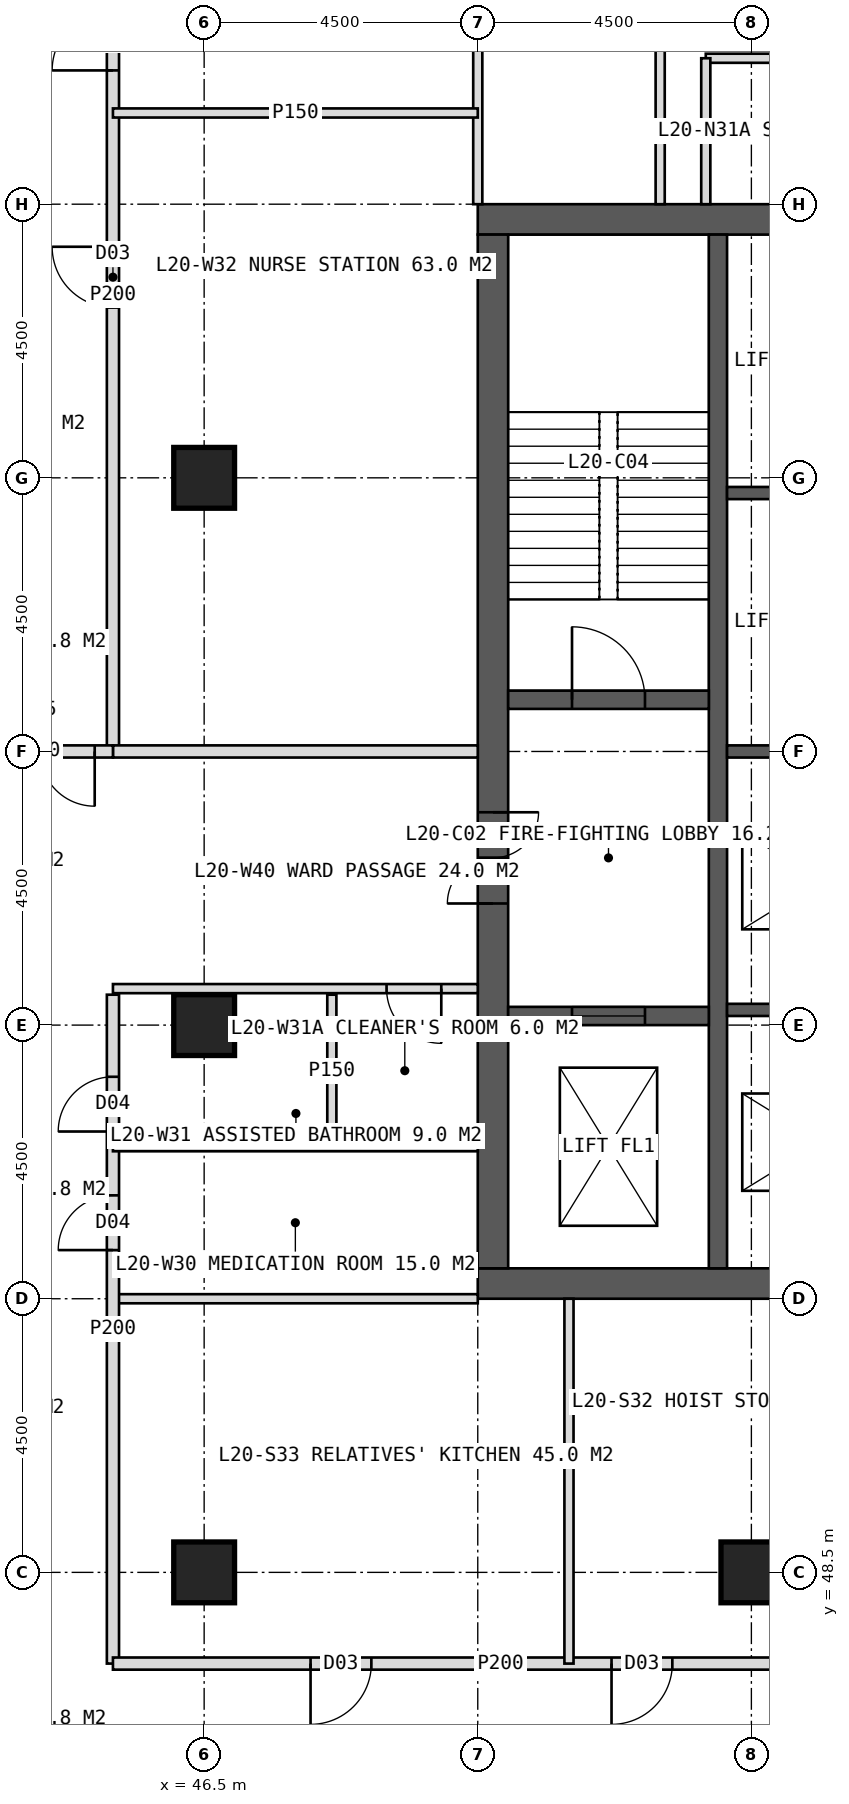
"""IFC4 building model, lengths in metres.
Left out: names, types, materials, properties, quantities, classifications, styles, units other than length and angle.
Written with IfcOpenShell. Run it as: python <this file> out.ifc"""

import sys

from ifc_helpers import new_model, si_unit, direction, frame, frame_2d, origin, origin_2d, place, context, subcontext, project, spatial, rectangle, hollow_rectangle, extrude, element, fill, save


model = new_model("IFC4")
c1 = context("Model", 3, precision=1e-05, world=origin(), true_north=direction((0.0, 1.0)))
c2 = subcontext(c1, "Body", "Model", "MODEL_VIEW")
j1 = project(units=[si_unit("LENGTHUNIT", "METRE"), si_unit("PLANEANGLEUNIT", "RADIAN")], contexts=[c1])
p1 = place(None, origin())
s1 = spatial("IfcSite", under=j1, at=p1, CompositionType="ELEMENT")
p2 = place(p1, origin())
s2 = spatial("IfcBuilding", under=s1, at=p2, CompositionType="ELEMENT")
p3 = place(p2, frame((0.0, 0.0, 87.0)))
s3 = spatial("IfcBuildingStorey", under=s2, at=p3, CompositionType="ELEMENT", Elevation=87.0)
p4 = place(p3, frame((51.0, 70.75, 0.0), z_axis=(0.0, 0.0, 1.0), x_axis=(1.0, 0.0, 0.0)))
e1 = element("IfcWall", 1, at=p4, inside=s3, PredefinedType="SHEAR", context=c2, shape_type="SweptSolid", body=[
    extrude(rectangle(XDim=18.0, YDim=0.5, at=frame_2d((9.0, 0.0))), origin(), (0.0, 0.0, 1.0), 4.0),
])
p5 = place(p4, frame((8.1, 0.0, 0.0)))
e2 = element("IfcOpeningElement", 2, at=p5, cuts=e1, PredefinedType="OPENING", context=c2, shape_type="SweptSolid", body=[
    extrude(rectangle(XDim=1.8, YDim=2.2, at=frame_2d((0.9, 1.1))), frame((0.0, 0.26, 0.0), z_axis=(0.0, -1.0, 0.0), x_axis=(1.0, 0.0, 0.0)), (0.0, 0.0, 1.0), 0.52),
])
p6 = place(p3, frame((51.0, 53.25, 0.0), z_axis=(0.0, 0.0, 1.0), x_axis=(1.0, 0.0, 0.0)))
e3 = element("IfcWall", 3, at=p6, inside=s3, PredefinedType="SHEAR", context=c2, shape_type="SweptSolid", body=[
    extrude(rectangle(XDim=18.0, YDim=0.5, at=frame_2d((9.0, 0.0))), origin(), (0.0, 0.0, 1.0), 4.0),
])
p7 = place(p6, frame((8.1, 0.0, 0.0)))
e4 = element("IfcOpeningElement", 4, at=p7, cuts=e3, PredefinedType="OPENING", context=c2, shape_type="SweptSolid", body=[
    extrude(rectangle(XDim=1.8, YDim=2.2, at=frame_2d((0.9, 1.1))), frame((0.0, 0.26, 0.0), z_axis=(0.0, -1.0, 0.0), x_axis=(1.0, 0.0, 0.0)), (0.0, 0.0, 1.0), 0.52),
])
p8 = place(p3, frame((51.25, 53.5, 0.0), z_axis=(0.0, 0.0, 1.0), x_axis=(0.0, 1.0, 0.0)))
e5 = element("IfcWall", 5, at=p8, inside=s3, PredefinedType="SHEAR", context=c2, shape_type="SweptSolid", body=[
    extrude(rectangle(XDim=17.0, YDim=0.5, at=frame_2d((8.5, 0.0))), origin(), (0.0, 0.0, 1.0), 4.0),
])
p9 = place(p8, frame((6.0, 0.0, 0.0)))
e6 = element("IfcOpeningElement", 6, at=p9, cuts=e5, PredefinedType="OPENING", context=c2, shape_type="SweptSolid", body=[
    extrude(rectangle(XDim=1.5, YDim=2.2, at=frame_2d((0.75, 1.1))), frame((0.0, 0.26, 0.0), z_axis=(0.0, -1.0, 0.0), x_axis=(1.0, 0.0, 0.0)), (0.0, 0.0, 1.0), 0.52),
])
p10 = place(p3, frame((54.95, 53.5, 0.0), z_axis=(0.0, 0.0, 1.0), x_axis=(0.0, 1.0, 0.0)))
e7 = element("IfcWall", 7, at=p10, inside=s3, PredefinedType="SHEAR", context=c2, shape_type="SweptSolid", body=[
    extrude(rectangle(XDim=17.0, YDim=0.3, at=frame_2d((8.5, 0.0))), origin(), (0.0, 0.0, 1.0), 4.0),
])
for number, where, z_axis, x_axis in (
    (8, (55.1, 57.75, 0.0), (0.0, 0.0, 1.0), (1.0, 0.0, 0.0)),
    (9, (55.1, 62.0, 0.0), (0.0, 0.0, 1.0), (1.0, 0.0, 0.0)),
    (10, (55.1, 66.25, 0.0), (0.0, 0.0, 1.0), (1.0, 0.0, 0.0)),
):
    element("IfcWall", number, at=place(p3, frame(where, z_axis=z_axis, x_axis=x_axis)), inside=s3, PredefinedType="SHEAR", context=c2, shape_type="SweptSolid", body=[
        extrude(rectangle(XDim=3.05, YDim=0.2, at=frame_2d((1.525, 0.0))), origin(), (0.0, 0.0, 1.0), 4.0),
    ])
p11 = place(p3, frame((51.5, 62.85, 0.0), z_axis=(0.0, 0.0, 1.0), x_axis=(1.0, 0.0, 0.0)))
e11 = element("IfcWall", 11, at=p11, inside=s3, PredefinedType="SHEAR", context=c2, shape_type="SweptSolid", body=[
    extrude(rectangle(XDim=3.3, YDim=0.3, at=frame_2d((1.65, 0.0))), origin(), (0.0, 0.0, 1.0), 4.0),
])
p12 = place(p11, frame((1.05, 0.0, 0.0)))
e12 = element("IfcOpeningElement", 12, at=p12, cuts=e11, PredefinedType="OPENING", context=c2, shape_type="SweptSolid", body=[
    extrude(rectangle(XDim=1.2, YDim=2.1, at=frame_2d((0.6, 1.05))), frame((0.0, 0.16, 0.0), z_axis=(0.0, -1.0, 0.0), x_axis=(1.0, 0.0, 0.0)), (0.0, 0.0, 1.0), 0.32),
])
p13 = place(p3, frame((51.5, 57.65, 0.0), z_axis=(0.0, 0.0, 1.0), x_axis=(1.0, 0.0, 0.0)))
e13 = element("IfcWall", 13, at=p13, inside=s3, PredefinedType="SHEAR", context=c2, shape_type="SweptSolid", body=[
    extrude(rectangle(XDim=3.3, YDim=0.3, at=frame_2d((1.65, 0.0))), origin(), (0.0, 0.0, 1.0), 4.0),
])
p14 = place(p13, frame((1.05, 0.0, 0.0)))
e14 = element("IfcOpeningElement", 14, at=p14, cuts=e13, PredefinedType="OPENING", context=c2, shape_type="SweptSolid", body=[
    extrude(rectangle(XDim=1.2, YDim=2.2, at=frame_2d((0.6, 1.1))), frame((0.0, 0.16, 0.0), z_axis=(0.0, -1.0, 0.0), x_axis=(1.0, 0.0, 0.0)), (0.0, 0.0, 1.0), 0.32),
])
for number, where, z_axis, x_axis in (
    (15, (46.5, 48.5, 0.0), (0.0, 0.0, 1.0), (1.0, 0.0, 0.0)),
    (16, (55.5, 48.5, 0.0), (0.0, 0.0, 1.0), (1.0, 0.0, 0.0)),
    (17, (46.5, 57.5, 0.0), (0.0, 0.0, 1.0), (1.0, 0.0, 0.0)),
    (18, (46.5, 66.5, 0.0), (0.0, 0.0, 1.0), (1.0, 0.0, 0.0)),
):
    element("IfcColumn", number, at=place(p3, frame(where, z_axis=z_axis, x_axis=x_axis)), inside=s3, PredefinedType="COLUMN", context=c2, shape_type="SweptSolid", body=[
        extrude(hollow_rectangle(XDim=1.0, YDim=1.0, WallThickness=0.1, at=origin_2d()), origin(), (0.0, 0.0, 1.0), 4.0),
    ])
for number, where, z_axis, x_axis in (
    (19, (51.0, 71.0, 0.0), (0.0, 0.0, 1.0), (0.0, 1.0, 0.0)),
    (20, (54.0, 71.0, 0.0), (0.0, 0.0, 1.0), (0.0, 1.0, 0.0)),
):
    element("IfcWall", number, at=place(p3, frame(where, z_axis=z_axis, x_axis=x_axis)), inside=s3, PredefinedType="PARTITIONING", context=c2, shape_type="SweptSolid", body=[
        extrude(rectangle(XDim=6.0, YDim=0.15, at=frame_2d((3.0, 0.0))), origin(), (0.0, 0.0, 1.0), 3.75),
    ])
p15 = place(p3, frame((54.75, 73.4, 0.0), z_axis=(0.0, 0.0, 1.0), x_axis=(1.0, 0.0, 0.0)))
e21 = element("IfcWall", 21, at=p15, inside=s3, PredefinedType="PARTITIONING", context=c2, shape_type="SweptSolid", body=[
    extrude(rectangle(XDim=3.0, YDim=0.15, at=frame_2d((1.5, 0.0))), origin(), (0.0, 0.0, 1.0), 3.75),
])
p16 = place(p3, frame((54.75, 71.0, 0.0), z_axis=(0.0, 0.0, 1.0), x_axis=(0.0, 1.0, 0.0)))
e22 = element("IfcWall", 22, at=p16, inside=s3, PredefinedType="PARTITIONING", context=c2, shape_type="SweptSolid", body=[
    extrude(rectangle(XDim=2.4, YDim=0.15, at=frame_2d((1.2, 0.0))), origin(), (0.0, 0.0, 1.0), 3.75),
])
p17 = place(p3, frame((51.0, 53.0, 0.0), z_axis=(0.0, 0.0, 1.0), x_axis=(-1.0, 0.0, 0.0)))
e23 = element("IfcWall", 23, at=p17, inside=s3, PredefinedType="PARTITIONING", context=c2, shape_type="SweptSolid", body=[
    extrude(rectangle(XDim=6.0, YDim=0.15, at=frame_2d((3.0, 0.0))), origin(), (0.0, 0.0, 1.0), 3.75),
])
p18 = place(p3, frame((45.0, 47.0, 0.0), z_axis=(0.0, 0.0, 1.0), x_axis=(0.0, 1.0, 0.0)))
e24 = element("IfcWall", 24, at=p18, inside=s3, PredefinedType="PARTITIONING", context=c2, shape_type="SweptSolid", body=[
    extrude(rectangle(XDim=11.0, YDim=0.2, at=frame_2d((5.5, 0.0))), origin(), (0.0, 0.0, 1.0), 3.75),
])
p19 = place(p18, frame((6.8, 0.0, 0.0)))
e25 = element("IfcOpeningElement", 25, at=p19, cuts=e24, PredefinedType="OPENING", context=c2, shape_type="SweptSolid", body=[
    extrude(rectangle(XDim=0.9, YDim=2.1, at=frame_2d((0.45, 1.05))), frame((0.0, 0.11, 0.0), z_axis=(0.0, -1.0, 0.0), x_axis=(1.0, 0.0, 0.0)), (0.0, 0.0, 1.0), 0.22),
])
p20 = place(p18, frame((8.75, 0.0, 0.0)))
e26 = element("IfcOpeningElement", 26, at=p20, cuts=e24, PredefinedType="OPENING", context=c2, shape_type="SweptSolid", body=[
    extrude(rectangle(XDim=0.9, YDim=2.1, at=frame_2d((0.45, 1.05))), frame((0.0, 0.11, 0.0), z_axis=(0.0, -1.0, 0.0), x_axis=(1.0, 0.0, 0.0)), (0.0, 0.0, 1.0), 0.22),
])
p21 = place(p3, frame((45.0, 62.0, 0.0), z_axis=(0.0, 0.0, 1.0), x_axis=(0.0, 1.0, 0.0)))
e27 = element("IfcWall", 27, at=p21, inside=s3, PredefinedType="PARTITIONING", context=c2, shape_type="SweptSolid", body=[
    extrude(rectangle(XDim=15.0, YDim=0.2, at=frame_2d((7.5, 0.0))), origin(), (0.0, 0.0, 1.0), 3.75),
])
p22 = place(p21, frame((7.3, 0.0, 0.0)))
e28 = element("IfcOpeningElement", 28, at=p22, cuts=e27, PredefinedType="OPENING", context=c2, shape_type="SweptSolid", body=[
    extrude(rectangle(XDim=1.0, YDim=2.1, at=frame_2d((0.5, 1.05))), frame((0.0, 0.11, 0.0), z_axis=(0.0, -1.0, 0.0), x_axis=(1.0, 0.0, 0.0)), (0.0, 0.0, 1.0), 0.22),
])
p23 = place(p21, frame((11.2, 0.0, 0.0)))
e29 = element("IfcOpeningElement", 29, at=p23, cuts=e27, PredefinedType="OPENING", context=c2, shape_type="SweptSolid", body=[
    extrude(rectangle(XDim=1.0, YDim=2.1, at=frame_2d((0.5, 1.05))), frame((0.0, 0.11, 0.0), z_axis=(0.0, -1.0, 0.0), x_axis=(1.0, 0.0, 0.0)), (0.0, 0.0, 1.0), 0.22),
])
p24 = place(p3, frame((51.0, 58.1, 0.0), z_axis=(0.0, 0.0, 1.0), x_axis=(-1.0, 0.0, 0.0)))
e30 = element("IfcWall", 30, at=p24, inside=s3, PredefinedType="PARTITIONING", context=c2, shape_type="SweptSolid", body=[
    extrude(rectangle(XDim=6.0, YDim=0.15, at=frame_2d((3.0, 0.0))), origin(), (0.0, 0.0, 1.0), 3.75),
])
p25 = place(p24, frame((0.6, 0.0, 0.0)))
e31 = element("IfcOpeningElement", 31, at=p25, cuts=e30, PredefinedType="OPENING", context=c2, shape_type="SweptSolid", body=[
    extrude(rectangle(XDim=0.9, YDim=2.1, at=frame_2d((0.45, 1.05))), frame((0.0, 0.085, 0.0), z_axis=(0.0, -1.0, 0.0), x_axis=(1.0, 0.0, 0.0)), (0.0, 0.0, 1.0), 0.17),
])
p26 = place(p3, frame((51.0, 62.0, 0.0), z_axis=(0.0, 0.0, 1.0), x_axis=(-1.0, 0.0, 0.0)))
e32 = element("IfcWall", 32, at=p26, inside=s3, PredefinedType="SOLIDWALL", context=c2, shape_type="SweptSolid", body=[
    extrude(rectangle(XDim=6.0, YDim=0.2, at=frame_2d((3.0, 0.0))), origin(), (0.0, 0.0, 1.0), 2.75),
])
for number, where, z_axis, x_axis in (
    (33, (51.0, 55.5, 0.0), (0.0, 0.0, 1.0), (-1.0, 0.0, 0.0)),
    (34, (51.0, 72.5, 0.0), (0.0, 0.0, 1.0), (-1.0, 0.0, 0.0)),
):
    element("IfcWall", number, at=place(p3, frame(where, z_axis=z_axis, x_axis=x_axis)), inside=s3, PredefinedType="PARTITIONING", context=c2, shape_type="SweptSolid", body=[
        extrude(rectangle(XDim=6.0, YDim=0.15, at=frame_2d((3.0, 0.0))), origin(), (0.0, 0.0, 1.0), 3.75),
    ])
p27 = place(p3, frame((48.6, 55.5, 0.0), z_axis=(0.0, 0.0, 1.0), x_axis=(0.0, 1.0, 0.0)))
e35 = element("IfcWall", 35, at=p27, inside=s3, PredefinedType="PARTITIONING", context=c2, shape_type="SweptSolid", body=[
    extrude(rectangle(XDim=2.5, YDim=0.15, at=frame_2d((1.25, 0.0))), origin(), (0.0, 0.0, 1.0), 3.75),
])
p28 = place(p3, frame((57.75, 47.0, 0.0), z_axis=(0.0, 0.0, 1.0), x_axis=(-1.0, 0.0, 0.0)))
e36 = element("IfcWall", 36, at=p28, inside=s3, PredefinedType="PARTITIONING", context=c2, shape_type="SweptSolid", body=[
    extrude(rectangle(XDim=12.75, YDim=0.2, at=frame_2d((6.375, 0.0))), origin(), (0.0, 0.0, 1.0), 3.75),
])
p29 = place(p28, frame((3.55, 0.0, 0.0)))
e37 = element("IfcOpeningElement", 37, at=p29, cuts=e36, PredefinedType="OPENING", context=c2, shape_type="SweptSolid", body=[
    extrude(rectangle(XDim=1.0, YDim=2.1, at=frame_2d((0.5, 1.05))), frame((0.0, 0.11, 0.0), z_axis=(0.0, -1.0, 0.0), x_axis=(1.0, 0.0, 0.0)), (0.0, 0.0, 1.0), 0.22),
])
p30 = place(p28, frame((8.5, 0.0, 0.0)))
e38 = element("IfcOpeningElement", 38, at=p30, cuts=e36, PredefinedType="OPENING", context=c2, shape_type="SweptSolid", body=[
    extrude(rectangle(XDim=1.0, YDim=2.1, at=frame_2d((0.5, 1.05))), frame((0.0, 0.11, 0.0), z_axis=(0.0, -1.0, 0.0), x_axis=(1.0, 0.0, 0.0)), (0.0, 0.0, 1.0), 0.22),
])
p31 = place(p3, frame((52.5, 53.0, 0.0), z_axis=(0.0, 0.0, 1.0), x_axis=(0.0, -1.0, 0.0)))
e39 = element("IfcWall", 39, at=p31, inside=s3, PredefinedType="PARTITIONING", context=c2, shape_type="SweptSolid", body=[
    extrude(rectangle(XDim=6.0, YDim=0.15, at=frame_2d((3.0, 0.0))), origin(), (0.0, 0.0, 1.0), 3.75),
])
p32 = place(p3, frame((45.0, 62.0, 0.0), z_axis=(0.0, 0.0, 1.0), x_axis=(-1.0, 0.0, 0.0)))
e40 = element("IfcWall", 40, at=p32, inside=s3, PredefinedType="SOLIDWALL", context=c2, shape_type="SweptSolid", body=[
    extrude(rectangle(XDim=2.7, YDim=0.2, at=frame_2d((1.35, 0.0))), origin(), (0.0, 0.0, 1.0), 2.75),
])
p33 = place(p32, frame((0.3, 0.0, 0.0)))
e41 = element("IfcOpeningElement", 41, at=p33, cuts=e40, PredefinedType="OPENING", context=c2, shape_type="SweptSolid", body=[
    extrude(rectangle(XDim=1.8, YDim=2.2, at=frame_2d((0.9, 1.1))), frame((0.0, 0.11, 0.0), z_axis=(0.0, -1.0, 0.0), x_axis=(1.0, 0.0, 0.0)), (0.0, 0.0, 1.0), 0.22),
])
p34 = place(p19, origin())
e42 = element("IfcDoor", 42, at=p34, inside=s3, OperationType="SINGLE_SWING_LEFT", PredefinedType="DOOR", context=c2, shape_type="SweptSolid", body=[
    extrude(rectangle(XDim=0.9, YDim=2.1, at=frame_2d((0.45, 1.05))), frame((0.0, 0.025, 0.0), z_axis=(0.0, -1.0, 0.0), x_axis=(1.0, 0.0, 0.0)), (0.0, 0.0, 1.0), 0.05),
])
fill(e25, e42)
p35 = place(p25, origin())
e43 = element("IfcDoor", 43, at=p35, inside=s3, OperationType="SINGLE_SWING_LEFT", PredefinedType="DOOR", context=c2, shape_type="SweptSolid", body=[
    extrude(rectangle(XDim=0.9, YDim=2.1, at=frame_2d((0.45, 1.05))), frame((0.0, 0.025, 0.0), z_axis=(0.0, -1.0, 0.0), x_axis=(1.0, 0.0, 0.0)), (0.0, 0.0, 1.0), 0.05),
])
fill(e31, e43)
p36 = place(p20, origin())
e44 = element("IfcDoor", 44, at=p36, inside=s3, OperationType="SINGLE_SWING_LEFT", PredefinedType="DOOR", context=c2, shape_type="SweptSolid", body=[
    extrude(rectangle(XDim=0.9, YDim=2.1, at=frame_2d((0.45, 1.05))), frame((0.0, 0.025, 0.0), z_axis=(0.0, -1.0, 0.0), x_axis=(1.0, 0.0, 0.0)), (0.0, 0.0, 1.0), 0.05),
])
fill(e26, e44)
p37 = place(p22, origin())
e45 = element("IfcDoor", 45, at=p37, inside=s3, OperationType="SINGLE_SWING_RIGHT", PredefinedType="DOOR", context=c2, shape_type="SweptSolid", body=[
    extrude(rectangle(XDim=1.0, YDim=2.1, at=frame_2d((0.5, 1.05))), frame((0.0, 0.025, 0.0), z_axis=(0.0, -1.0, 0.0), x_axis=(1.0, 0.0, 0.0)), (0.0, 0.0, 1.0), 0.05),
])
fill(e28, e45)
p38 = place(p23, origin())
e46 = element("IfcDoor", 46, at=p38, inside=s3, OperationType="SINGLE_SWING_LEFT", PredefinedType="DOOR", context=c2, shape_type="SweptSolid", body=[
    extrude(rectangle(XDim=1.0, YDim=2.1, at=frame_2d((0.5, 1.05))), frame((0.0, 0.025, 0.0), z_axis=(0.0, -1.0, 0.0), x_axis=(1.0, 0.0, 0.0)), (0.0, 0.0, 1.0), 0.05),
])
fill(e29, e46)
p39 = place(p29, origin())
e47 = element("IfcDoor", 47, at=p39, inside=s3, OperationType="SINGLE_SWING_RIGHT", PredefinedType="DOOR", context=c2, shape_type="SweptSolid", body=[
    extrude(rectangle(XDim=1.0, YDim=2.1, at=frame_2d((0.5, 1.05))), frame((0.0, 0.025, 0.0), z_axis=(0.0, -1.0, 0.0), x_axis=(1.0, 0.0, 0.0)), (0.0, 0.0, 1.0), 0.05),
])
fill(e37, e47)
p40 = place(p30, origin())
e48 = element("IfcDoor", 48, at=p40, inside=s3, OperationType="SINGLE_SWING_RIGHT", PredefinedType="DOOR", context=c2, shape_type="SweptSolid", body=[
    extrude(rectangle(XDim=1.0, YDim=2.1, at=frame_2d((0.5, 1.05))), frame((0.0, 0.025, 0.0), z_axis=(0.0, -1.0, 0.0), x_axis=(1.0, 0.0, 0.0)), (0.0, 0.0, 1.0), 0.05),
])
fill(e38, e48)
p41 = place(p33, origin())
e49 = element("IfcDoor", 49, at=p41, inside=s3, OperationType="DOUBLE_DOOR_DOUBLE_SWING", PredefinedType="DOOR", context=c2, shape_type="SweptSolid", body=[
    extrude(rectangle(XDim=1.8, YDim=2.2, at=frame_2d((0.9, 1.1))), frame((0.0, 0.025, 0.0), z_axis=(0.0, -1.0, 0.0), x_axis=(1.0, 0.0, 0.0)), (0.0, 0.0, 1.0), 0.05),
])
fill(e41, e49)
p42 = place(p9, origin())
e50 = element("IfcDoor", 50, at=p42, inside=s3, OperationType="DOUBLE_DOOR_SINGLE_SWING", PredefinedType="DOOR", context=c2, shape_type="SweptSolid", body=[
    extrude(rectangle(XDim=1.5, YDim=2.2, at=frame_2d((0.75, 1.1))), frame((0.0, 0.025, 0.0), z_axis=(0.0, -1.0, 0.0), x_axis=(1.0, 0.0, 0.0)), (0.0, 0.0, 1.0), 0.05),
])
fill(e6, e50)
p43 = place(p12, origin())
e51 = element("IfcDoor", 51, at=p43, inside=s3, OperationType="SINGLE_SWING_LEFT", PredefinedType="DOOR", context=c2, shape_type="SweptSolid", body=[
    extrude(rectangle(XDim=1.2, YDim=2.1, at=frame_2d((0.6, 1.05))), frame((0.0, 0.025, 0.0), z_axis=(0.0, -1.0, 0.0), x_axis=(1.0, 0.0, 0.0)), (0.0, 0.0, 1.0), 0.05),
])
fill(e12, e51)
p44 = place(p14, origin())
e52 = element("IfcDoor", 52, at=p44, inside=s3, OperationType="SLIDING_TO_LEFT", PredefinedType="DOOR", context=c2, shape_type="SweptSolid", body=[
    extrude(rectangle(XDim=1.2, YDim=2.2, at=frame_2d((0.6, 1.1))), frame((0.0, 0.025, 0.0), z_axis=(0.0, -1.0, 0.0), x_axis=(1.0, 0.0, 0.0)), (0.0, 0.0, 1.0), 0.05),
])
fill(e14, e52)
save(model, sys.argv[1])
